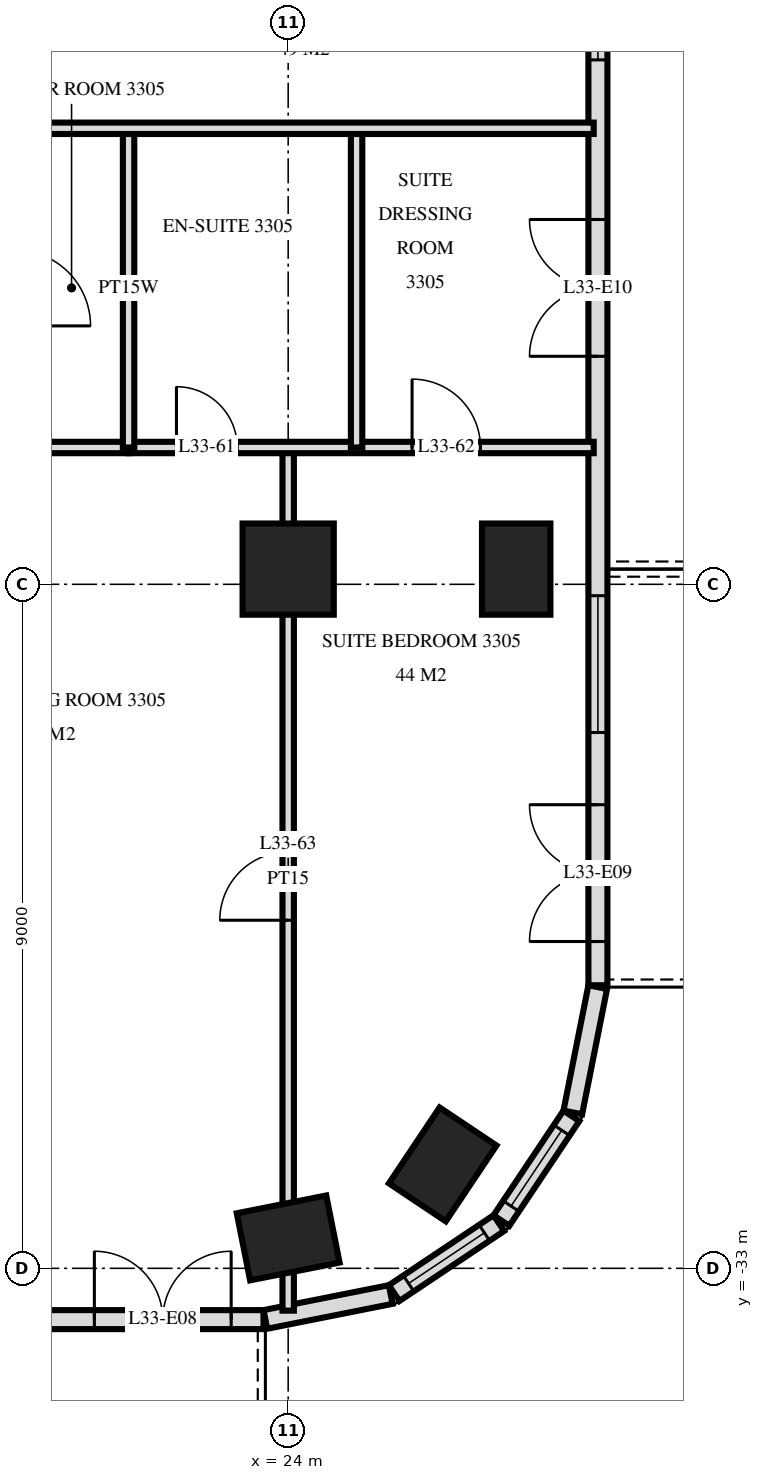
"""IFC4 building model, lengths in metres.
Left out: names, types, materials, properties, quantities, classifications, styles, units other than length and angle.
Written with IfcOpenShell. Run it as: python <this file> out.ifc"""

import sys

from ifc_helpers import new_model, si_unit, direction, frame, frame_2d, origin, origin_2d, place, context, subcontext, project, spatial, rectangle, extrude, element, fill, save


model = new_model("IFC4")
c1 = context("Model", 3, precision=1e-05, world=origin(), true_north=direction((0.0, 1.0)))
c2 = subcontext(c1, "Body", "Model", "MODEL_VIEW")
j1 = project(units=[si_unit("LENGTHUNIT", "METRE"), si_unit("PLANEANGLEUNIT", "RADIAN")], contexts=[c1])
p1 = place(None, origin())
s1 = spatial("IfcSite", under=j1, at=p1, CompositionType="ELEMENT")
p2 = place(p1, origin())
s2 = spatial("IfcBuilding", under=s1, at=p2, CompositionType="ELEMENT")
p3 = place(p2, frame((0.0, 0.0, 130.8)))
s3 = spatial("IfcBuildingStorey", under=s2, at=p3, CompositionType="ELEMENT", Elevation=130.8)
p4 = place(p3, frame((24.0, -32.6, 0.0), z_axis=(0.0, 0.0, 1.0), x_axis=(0.980792089743, 0.195056086032, 0.0)))
e1 = element("IfcColumn", 1, at=p4, inside=s3, PredefinedType="COLUMN", context=c2, shape_type="SweptSolid", body=[
    extrude(rectangle(XDim=1.2, YDim=0.9, at=origin_2d()), origin(), (0.0, 0.0, 1.0), 3.6),
])
p5 = place(p3, frame((24.0, -23.8, 0.0), z_axis=(0.0, 0.0, 1.0), x_axis=(1.0, 0.0, 0.0)))
e2 = element("IfcColumn", 2, at=p5, inside=s3, PredefinedType="COLUMN", context=c2, shape_type="SweptSolid", body=[
    extrude(rectangle(XDim=1.2, YDim=1.2, at=origin_2d()), origin(), (0.0, 0.0, 1.0), 3.6),
])
for number, where, z_axis, x_axis in (
    (3, (26.033, -31.633, 0.0), (0.0, 0.0, 1.0), (0.556, 0.831, 0.0)),
    (4, (27.0, -23.8, 0.0), (0.0, 0.0, 1.0), (0.0, 1.0, 0.0)),
):
    element("IfcColumn", number, at=place(p3, frame(where, z_axis=z_axis, x_axis=x_axis)), inside=s3, PredefinedType="COLUMN", context=c2, shape_type="SweptSolid", body=[
        extrude(rectangle(XDim=1.2, YDim=0.9, at=origin_2d()), origin(), (0.0, 0.0, 1.0), 3.6),
    ])
p6 = place(p3, frame((-23.675, -33.675, 0.0), z_axis=(0.0, 0.0, 1.0), x_axis=(1.0, 0.0, 0.0)))
e5 = element("IfcWall", 5, at=p6, inside=s3, PredefinedType="SOLIDWALL", context=c2, shape_type="SweptSolid", body=[
    extrude(rectangle(XDim=47.351, YDim=0.25, at=frame_2d((23.675, 0.0))), origin(), (0.0, 0.0, 1.0), 3.32),
])
p7 = place(p6, frame((3.425, 0.0, 0.0)))
e6 = element("IfcOpeningElement", 6, at=p7, cuts=e5, PredefinedType="OPENING", context=c2, shape_type="SweptSolid", body=[
    extrude(rectangle(XDim=1.8, YDim=2.4, at=frame_2d((0.9, 1.2))), frame((0.0, 0.135, 0.0), z_axis=(0.0, -1.0, 0.0), x_axis=(1.0, 0.0, 0.0)), (0.0, 0.0, 1.0), 0.27),
])
p8 = place(p6, frame((6.275, 0.0, 0.0)))
e7 = element("IfcOpeningElement", 7, at=p8, cuts=e5, PredefinedType="OPENING", context=c2, shape_type="SweptSolid", body=[
    extrude(rectangle(XDim=1.8, YDim=2.4, at=frame_2d((0.9, 1.2))), frame((0.0, 0.135, 0.0), z_axis=(0.0, -1.0, 0.0), x_axis=(1.0, 0.0, 0.0)), (0.0, 0.0, 1.0), 0.27),
])
p9 = place(p6, frame((8.975, 0.0, 0.3)))
e8 = element("IfcOpeningElement", 8, at=p9, cuts=e5, PredefinedType="OPENING", context=c2, shape_type="SweptSolid", body=[
    extrude(rectangle(XDim=2.4, YDim=2.1, at=frame_2d((1.2, 1.05))), frame((0.0, 0.135, 0.0), z_axis=(0.0, -1.0, 0.0), x_axis=(1.0, 0.0, 0.0)), (0.0, 0.0, 1.0), 0.27),
])
p10 = place(p6, frame((12.275, 0.0, 0.0)))
e9 = element("IfcOpeningElement", 9, at=p10, cuts=e5, PredefinedType="OPENING", context=c2, shape_type="SweptSolid", body=[
    extrude(rectangle(XDim=1.8, YDim=2.4, at=frame_2d((0.9, 1.2))), frame((0.0, 0.135, 0.0), z_axis=(0.0, -1.0, 0.0), x_axis=(1.0, 0.0, 0.0)), (0.0, 0.0, 1.0), 0.27),
])
p11 = place(p6, frame((14.975, 0.0, 0.3)))
e10 = element("IfcOpeningElement", 10, at=p11, cuts=e5, PredefinedType="OPENING", context=c2, shape_type="SweptSolid", body=[
    extrude(rectangle(XDim=2.4, YDim=2.1, at=frame_2d((1.2, 1.05))), frame((0.0, 0.135, 0.0), z_axis=(0.0, -1.0, 0.0), x_axis=(1.0, 0.0, 0.0)), (0.0, 0.0, 1.0), 0.27),
])
p12 = place(p6, frame((17.975, 0.0, 0.3)))
e11 = element("IfcOpeningElement", 11, at=p12, cuts=e5, PredefinedType="OPENING", context=c2, shape_type="SweptSolid", body=[
    extrude(rectangle(XDim=2.4, YDim=2.1, at=frame_2d((1.2, 1.05))), frame((0.0, 0.135, 0.0), z_axis=(0.0, -1.0, 0.0), x_axis=(1.0, 0.0, 0.0)), (0.0, 0.0, 1.0), 0.27),
])
p13 = place(p6, frame((21.275, 0.0, 0.0)))
e12 = element("IfcOpeningElement", 12, at=p13, cuts=e5, PredefinedType="OPENING", context=c2, shape_type="SweptSolid", body=[
    extrude(rectangle(XDim=1.8, YDim=2.4, at=frame_2d((0.9, 1.2))), frame((0.0, 0.135, 0.0), z_axis=(0.0, -1.0, 0.0), x_axis=(1.0, 0.0, 0.0)), (0.0, 0.0, 1.0), 0.27),
])
p14 = place(p6, frame((24.275, 0.0, 0.0)))
e13 = element("IfcOpeningElement", 13, at=p14, cuts=e5, PredefinedType="OPENING", context=c2, shape_type="SweptSolid", body=[
    extrude(rectangle(XDim=1.8, YDim=2.4, at=frame_2d((0.9, 1.2))), frame((0.0, 0.135, 0.0), z_axis=(0.0, -1.0, 0.0), x_axis=(1.0, 0.0, 0.0)), (0.0, 0.0, 1.0), 0.27),
])
p15 = place(p6, frame((26.975, 0.0, 0.3)))
e14 = element("IfcOpeningElement", 14, at=p15, cuts=e5, PredefinedType="OPENING", context=c2, shape_type="SweptSolid", body=[
    extrude(rectangle(XDim=2.4, YDim=2.1, at=frame_2d((1.2, 1.05))), frame((0.0, 0.135, 0.0), z_axis=(0.0, -1.0, 0.0), x_axis=(1.0, 0.0, 0.0)), (0.0, 0.0, 1.0), 0.27),
])
p16 = place(p6, frame((30.275, 0.0, 0.0)))
e15 = element("IfcOpeningElement", 15, at=p16, cuts=e5, PredefinedType="OPENING", context=c2, shape_type="SweptSolid", body=[
    extrude(rectangle(XDim=1.8, YDim=2.4, at=frame_2d((0.9, 1.2))), frame((0.0, 0.135, 0.0), z_axis=(0.0, -1.0, 0.0), x_axis=(1.0, 0.0, 0.0)), (0.0, 0.0, 1.0), 0.27),
])
p17 = place(p6, frame((32.975, 0.0, 0.3)))
e16 = element("IfcOpeningElement", 16, at=p17, cuts=e5, PredefinedType="OPENING", context=c2, shape_type="SweptSolid", body=[
    extrude(rectangle(XDim=2.4, YDim=2.1, at=frame_2d((1.2, 1.05))), frame((0.0, 0.135, 0.0), z_axis=(0.0, -1.0, 0.0), x_axis=(1.0, 0.0, 0.0)), (0.0, 0.0, 1.0), 0.27),
])
p18 = place(p6, frame((36.275, 0.0, 0.0)))
e17 = element("IfcOpeningElement", 17, at=p18, cuts=e5, PredefinedType="OPENING", context=c2, shape_type="SweptSolid", body=[
    extrude(rectangle(XDim=1.8, YDim=2.4, at=frame_2d((0.9, 1.2))), frame((0.0, 0.135, 0.0), z_axis=(0.0, -1.0, 0.0), x_axis=(1.0, 0.0, 0.0)), (0.0, 0.0, 1.0), 0.27),
])
p19 = place(p6, frame((38.975, 0.0, 0.3)))
e18 = element("IfcOpeningElement", 18, at=p19, cuts=e5, PredefinedType="OPENING", context=c2, shape_type="SweptSolid", body=[
    extrude(rectangle(XDim=2.4, YDim=2.1, at=frame_2d((1.2, 1.05))), frame((0.0, 0.135, 0.0), z_axis=(0.0, -1.0, 0.0), x_axis=(1.0, 0.0, 0.0)), (0.0, 0.0, 1.0), 0.27),
])
p20 = place(p6, frame((41.975, 0.0, 0.3)))
e19 = element("IfcOpeningElement", 19, at=p20, cuts=e5, PredefinedType="OPENING", context=c2, shape_type="SweptSolid", body=[
    extrude(rectangle(XDim=2.4, YDim=2.1, at=frame_2d((1.2, 1.05))), frame((0.0, 0.135, 0.0), z_axis=(0.0, -1.0, 0.0), x_axis=(1.0, 0.0, 0.0)), (0.0, 0.0, 1.0), 0.27),
])
p21 = place(p6, frame((45.125, 0.0, 0.0)))
e20 = element("IfcOpeningElement", 20, at=p21, cuts=e5, PredefinedType="OPENING", context=c2, shape_type="SweptSolid", body=[
    extrude(rectangle(XDim=1.8, YDim=2.4, at=frame_2d((0.9, 1.2))), frame((0.0, 0.135, 0.0), z_axis=(0.0, -1.0, 0.0), x_axis=(1.0, 0.0, 0.0)), (0.0, 0.0, 1.0), 0.27),
])
p22 = place(p3, frame((23.7, -33.673, 0.0), z_axis=(0.0, 0.0, 1.0), x_axis=(0.980775640221, 0.19513878023, 0.0)))
e21 = element("IfcWall", 21, at=p22, inside=s3, PredefinedType="SOLIDWALL", context=c2, shape_type="SweptSolid", body=[
    extrude(rectangle(XDim=1.681, YDim=0.25, at=frame_2d((0.841, 0.0))), origin(), (0.0, 0.0, 1.0), 3.32),
])
p23 = place(p3, frame((25.394, -33.326, 0.0), z_axis=(0.0, 0.0, 1.0), x_axis=(0.831482937015, 0.55555029066, 0.0)))
e22 = element("IfcWall", 22, at=p23, inside=s3, PredefinedType="SOLIDWALL", context=c2, shape_type="SweptSolid", body=[
    extrude(rectangle(XDim=1.656, YDim=0.25, at=frame_2d((0.828, 0.0))), origin(), (0.0, 0.0, 1.0), 3.32),
])
p24 = place(p23, frame((0.228, 0.0, 0.9)))
e23 = element("IfcOpeningElement", 23, at=p24, cuts=e22, PredefinedType="OPENING", context=c2, shape_type="SweptSolid", body=[
    extrude(rectangle(XDim=1.2, YDim=1.5, at=frame_2d((0.6, 0.75))), frame((0.0, 0.135, 0.0), z_axis=(0.0, -1.0, 0.0), x_axis=(1.0, 0.0, 0.0)), (0.0, 0.0, 1.0), 0.27),
])
p25 = place(p3, frame((26.806, -32.371, 0.0), z_axis=(0.0, 0.0, 1.0), x_axis=(0.55555029066, 0.831482937015, 0.0)))
e24 = element("IfcWall", 24, at=p25, inside=s3, PredefinedType="SOLIDWALL", context=c2, shape_type="SweptSolid", body=[
    extrude(rectangle(XDim=1.656, YDim=0.25, at=frame_2d((0.828, 0.0))), origin(), (0.0, 0.0, 1.0), 3.32),
])
p26 = place(p25, frame((0.228, 0.0, 0.9)))
e25 = element("IfcOpeningElement", 25, at=p26, cuts=e24, PredefinedType="OPENING", context=c2, shape_type="SweptSolid", body=[
    extrude(rectangle(XDim=1.2, YDim=1.5, at=frame_2d((0.6, 0.75))), frame((0.0, 0.135, 0.0), z_axis=(0.0, -1.0, 0.0), x_axis=(1.0, 0.0, 0.0)), (0.0, 0.0, 1.0), 0.27),
])
p27 = place(p3, frame((27.745, -30.949, 0.0), z_axis=(0.0, 0.0, 1.0), x_axis=(0.194999110559, 0.980803419081, 0.0)))
e26 = element("IfcWall", 26, at=p27, inside=s3, PredefinedType="SOLIDWALL", context=c2, shape_type="SweptSolid", body=[
    extrude(rectangle(XDim=1.681, YDim=0.25, at=frame_2d((0.841, 0.0))), origin(), (0.0, 0.0, 1.0), 3.32),
])
p28 = place(p3, frame((28.075, -29.275, 0.0), z_axis=(0.0, 0.0, 1.0), x_axis=(0.0, 1.0, 0.0)))
e27 = element("IfcWall", 27, at=p28, inside=s3, PredefinedType="SOLIDWALL", context=c2, shape_type="SweptSolid", body=[
    extrude(rectangle(XDim=25.951, YDim=0.25, at=frame_2d((12.975, 0.0))), origin(), (0.0, 0.0, 1.0), 3.32),
])
p29 = place(p28, frame((0.575, 0.0, 0.0)))
e28 = element("IfcOpeningElement", 28, at=p29, cuts=e27, PredefinedType="OPENING", context=c2, shape_type="SweptSolid", body=[
    extrude(rectangle(XDim=1.8, YDim=2.4, at=frame_2d((0.9, 1.2))), frame((0.0, 0.135, 0.0), z_axis=(0.0, -1.0, 0.0), x_axis=(1.0, 0.0, 0.0)), (0.0, 0.0, 1.0), 0.27),
])
p30 = place(p28, frame((3.325, 0.0, 0.3)))
e29 = element("IfcOpeningElement", 29, at=p30, cuts=e27, PredefinedType="OPENING", context=c2, shape_type="SweptSolid", body=[
    extrude(rectangle(XDim=1.8, YDim=2.1, at=frame_2d((0.9, 1.05))), frame((0.0, 0.135, 0.0), z_axis=(0.0, -1.0, 0.0), x_axis=(1.0, 0.0, 0.0)), (0.0, 0.0, 1.0), 0.27),
])
p31 = place(p28, frame((8.275, 0.0, 0.0)))
e30 = element("IfcOpeningElement", 30, at=p31, cuts=e27, PredefinedType="OPENING", context=c2, shape_type="SweptSolid", body=[
    extrude(rectangle(XDim=1.8, YDim=2.4, at=frame_2d((0.9, 1.2))), frame((0.0, 0.135, 0.0), z_axis=(0.0, -1.0, 0.0), x_axis=(1.0, 0.0, 0.0)), (0.0, 0.0, 1.0), 0.27),
])
p32 = place(p28, frame((12.175, 0.0, 0.3)))
e31 = element("IfcOpeningElement", 31, at=p32, cuts=e27, PredefinedType="OPENING", context=c2, shape_type="SweptSolid", body=[
    extrude(rectangle(XDim=1.2, YDim=2.1, at=frame_2d((0.6, 1.05))), frame((0.0, 0.135, 0.0), z_axis=(0.0, -1.0, 0.0), x_axis=(1.0, 0.0, 0.0)), (0.0, 0.0, 1.0), 0.27),
])
p33 = place(p28, frame((16.375, 0.0, 0.0)))
e32 = element("IfcOpeningElement", 32, at=p33, cuts=e27, PredefinedType="OPENING", context=c2, shape_type="SweptSolid", body=[
    extrude(rectangle(XDim=1.8, YDim=2.4, at=frame_2d((0.9, 1.2))), frame((0.0, 0.135, 0.0), z_axis=(0.0, -1.0, 0.0), x_axis=(1.0, 0.0, 0.0)), (0.0, 0.0, 1.0), 0.27),
])
p34 = place(p3, frame((24.9, -22.2, 0.0), z_axis=(0.0, 0.0, 1.0), x_axis=(0.0, 1.0, 0.0)))
e33 = element("IfcWall", 33, at=p34, inside=s3, PredefinedType="PARTITIONING", context=c2, shape_type="SweptSolid", body=[
    extrude(rectangle(XDim=4.2, YDim=0.15, at=frame_2d((2.1, 0.0))), origin(), (0.0, 0.0, 1.0), 3.32),
])
p35 = place(p3, frame((24.0, -33.557, 0.0), z_axis=(0.0, 0.0, 1.0), x_axis=(0.0, 1.0, 0.0)))
e34 = element("IfcWall", 34, at=p35, inside=s3, PredefinedType="PARTITIONING", context=c2, shape_type="SweptSolid", body=[
    extrude(rectangle(XDim=11.357, YDim=0.15, at=frame_2d((5.678, 0.0))), origin(), (0.0, 0.0, 1.0), 3.32),
])
p36 = place(p35, frame((5.137, 0.0, 0.0)))
e35 = element("IfcOpeningElement", 35, at=p36, cuts=e34, PredefinedType="OPENING", context=c2, shape_type="SweptSolid", body=[
    extrude(rectangle(XDim=0.9, YDim=2.1, at=frame_2d((0.45, 1.05))), frame((0.0, 0.085, 0.0), z_axis=(0.0, -1.0, 0.0), x_axis=(1.0, 0.0, 0.0)), (0.0, 0.0, 1.0), 0.17),
])
p37 = place(p3, frame((21.9, -22.2, 0.0), z_axis=(0.0, 0.0, 1.0), x_axis=(0.0, 1.0, 0.0)))
e36 = element("IfcWall", 36, at=p37, inside=s3, PredefinedType="PLUMBINGWALL", context=c2, shape_type="SweptSolid", body=[
    extrude(rectangle(XDim=4.2, YDim=0.15, at=frame_2d((2.1, 0.0))), origin(), (0.0, 0.0, 1.0), 3.32),
])
p38 = place(p3, frame((21.9, -22.2, 0.0), z_axis=(0.0, 0.0, 1.0), x_axis=(1.0, 0.0, 0.0)))
e37 = element("IfcWall", 37, at=p38, inside=s3, PredefinedType="PARTITIONING", context=c2, shape_type="SweptSolid", body=[
    extrude(rectangle(XDim=6.12, YDim=0.15, at=frame_2d((3.06, 0.0))), origin(), (0.0, 0.0, 1.0), 3.32),
])
p39 = place(p38, frame((0.63, 0.0, 0.0)))
e38 = element("IfcOpeningElement", 38, at=p39, cuts=e37, PredefinedType="OPENING", context=c2, shape_type="SweptSolid", body=[
    extrude(rectangle(XDim=0.8, YDim=2.1, at=frame_2d((0.4, 1.05))), frame((0.0, 0.085, 0.0), z_axis=(0.0, -1.0, 0.0), x_axis=(1.0, 0.0, 0.0)), (0.0, 0.0, 1.0), 0.17),
])
p40 = place(p38, frame((3.73, 0.0, 0.0)))
e39 = element("IfcOpeningElement", 39, at=p40, cuts=e37, PredefinedType="OPENING", context=c2, shape_type="SweptSolid", body=[
    extrude(rectangle(XDim=0.9, YDim=2.1, at=frame_2d((0.45, 1.05))), frame((0.0, 0.085, 0.0), z_axis=(0.0, -1.0, 0.0), x_axis=(1.0, 0.0, 0.0)), (0.0, 0.0, 1.0), 0.17),
])
p41 = place(p3, frame((20.4, -22.2, 0.0), z_axis=(0.0, 0.0, 1.0), x_axis=(1.0, 0.0, 0.0)))
e40 = element("IfcWall", 40, at=p41, inside=s3, PredefinedType="PLUMBINGWALL", context=c2, shape_type="SweptSolid", body=[
    extrude(rectangle(XDim=1.5, YDim=0.15, at=frame_2d((0.75, 0.0))), origin(), (0.0, 0.0, 1.0), 3.32),
])
p42 = place(p3, frame((-28.02, -18.0, 0.0), z_axis=(0.0, 0.0, 1.0), x_axis=(1.0, 0.0, 0.0)))
e41 = element("IfcWall", 41, at=p42, inside=s3, PredefinedType="PARTITIONING", context=c2, shape_type="SweptSolid", body=[
    extrude(rectangle(XDim=56.04, YDim=0.15, at=frame_2d((28.02, 0.0))), origin(), (0.0, 0.0, 1.0), 3.32),
])
p43 = place(p42, frame((13.17, 0.0, 0.0)))
e42 = element("IfcOpeningElement", 42, at=p43, cuts=e41, PredefinedType="OPENING", context=c2, shape_type="SweptSolid", body=[
    extrude(rectangle(XDim=1.0, YDim=2.1, at=frame_2d((0.5, 1.05))), frame((0.0, 0.085, 0.0), z_axis=(0.0, -1.0, 0.0), x_axis=(1.0, 0.0, 0.0)), (0.0, 0.0, 1.0), 0.17),
])
p44 = place(p42, frame((11.32, 0.0, 0.0)))
e43 = element("IfcOpeningElement", 43, at=p44, cuts=e41, PredefinedType="OPENING", context=c2, shape_type="SweptSolid", body=[
    extrude(rectangle(XDim=1.0, YDim=2.1, at=frame_2d((0.5, 1.05))), frame((0.0, 0.085, 0.0), z_axis=(0.0, -1.0, 0.0), x_axis=(1.0, 0.0, 0.0)), (0.0, 0.0, 1.0), 0.17),
])
p45 = place(p42, frame((41.87, 0.0, 0.0)))
e44 = element("IfcOpeningElement", 44, at=p45, cuts=e41, PredefinedType="OPENING", context=c2, shape_type="SweptSolid", body=[
    extrude(rectangle(XDim=1.0, YDim=2.1, at=frame_2d((0.5, 1.05))), frame((0.0, 0.085, 0.0), z_axis=(0.0, -1.0, 0.0), x_axis=(1.0, 0.0, 0.0)), (0.0, 0.0, 1.0), 0.17),
])
p46 = place(p42, frame((43.17, 0.0, 0.0)))
e45 = element("IfcOpeningElement", 45, at=p46, cuts=e41, PredefinedType="OPENING", context=c2, shape_type="SweptSolid", body=[
    extrude(rectangle(XDim=1.0, YDim=2.1, at=frame_2d((0.5, 1.05))), frame((0.0, 0.085, 0.0), z_axis=(0.0, -1.0, 0.0), x_axis=(1.0, 0.0, 0.0)), (0.0, 0.0, 1.0), 0.17),
])
p47 = place(p42, frame((46.72, 0.0, 0.0)))
e46 = element("IfcOpeningElement", 46, at=p47, cuts=e41, PredefinedType="OPENING", context=c2, shape_type="SweptSolid", body=[
    extrude(rectangle(XDim=1.0, YDim=2.1, at=frame_2d((0.5, 1.05))), frame((0.0, 0.085, 0.0), z_axis=(0.0, -1.0, 0.0), x_axis=(1.0, 0.0, 0.0)), (0.0, 0.0, 1.0), 0.17),
])
p48 = place(p42, frame((21.52, 0.0, 0.0)))
e47 = element("IfcOpeningElement", 47, at=p48, cuts=e41, PredefinedType="OPENING", context=c2, shape_type="SweptSolid", body=[
    extrude(rectangle(XDim=1.0, YDim=2.1, at=frame_2d((0.5, 1.05))), frame((0.0, 0.085, 0.0), z_axis=(0.0, -1.0, 0.0), x_axis=(1.0, 0.0, 0.0)), (0.0, 0.0, 1.0), 0.17),
])
p49 = place(p42, frame((33.52, 0.0, 0.0)))
e48 = element("IfcOpeningElement", 48, at=p49, cuts=e41, PredefinedType="OPENING", context=c2, shape_type="SweptSolid", body=[
    extrude(rectangle(XDim=1.0, YDim=2.1, at=frame_2d((0.5, 1.05))), frame((0.0, 0.085, 0.0), z_axis=(0.0, -1.0, 0.0), x_axis=(1.0, 0.0, 0.0)), (0.0, 0.0, 1.0), 0.17),
])
p50 = place(p24, origin())
e49 = element("IfcWindow", 49, at=p50, inside=s3, PartitioningType="SINGLE_PANEL", PredefinedType="WINDOW", context=c2, shape_type="SweptSolid", body=[
    extrude(rectangle(XDim=1.2, YDim=1.5, at=frame_2d((0.6, 0.75))), frame((0.0, 0.03, 0.0), z_axis=(0.0, -1.0, 0.0), x_axis=(1.0, 0.0, 0.0)), (0.0, 0.0, 1.0), 0.06),
])
fill(e23, e49)
p51 = place(p26, origin())
e50 = element("IfcWindow", 50, at=p51, inside=s3, PartitioningType="SINGLE_PANEL", PredefinedType="WINDOW", context=c2, shape_type="SweptSolid", body=[
    extrude(rectangle(XDim=1.2, YDim=1.5, at=frame_2d((0.6, 0.75))), frame((0.0, 0.03, 0.0), z_axis=(0.0, -1.0, 0.0), x_axis=(1.0, 0.0, 0.0)), (0.0, 0.0, 1.0), 0.06),
])
fill(e25, e50)
p52 = place(p21, origin())
e51 = element("IfcDoor", 51, at=p52, inside=s3, OperationType="DOUBLE_DOOR_SINGLE_SWING", PredefinedType="DOOR", context=c2, shape_type="SweptSolid", body=[
    extrude(rectangle(XDim=1.8, YDim=2.4, at=frame_2d((0.9, 1.2))), frame((0.0, 0.025, 0.0), z_axis=(0.0, -1.0, 0.0), x_axis=(1.0, 0.0, 0.0)), (0.0, 0.0, 1.0), 0.05),
])
fill(e20, e51)
p53 = place(p29, origin())
e52 = element("IfcDoor", 52, at=p53, inside=s3, OperationType="DOUBLE_DOOR_SINGLE_SWING", PredefinedType="DOOR", context=c2, shape_type="SweptSolid", body=[
    extrude(rectangle(XDim=1.8, YDim=2.4, at=frame_2d((0.9, 1.2))), frame((0.0, 0.025, 0.0), z_axis=(0.0, -1.0, 0.0), x_axis=(1.0, 0.0, 0.0)), (0.0, 0.0, 1.0), 0.05),
])
fill(e28, e52)
p54 = place(p30, origin())
e53 = element("IfcWindow", 53, at=p54, inside=s3, PartitioningType="SINGLE_PANEL", PredefinedType="WINDOW", context=c2, shape_type="SweptSolid", body=[
    extrude(rectangle(XDim=1.8, YDim=2.1, at=frame_2d((0.9, 1.05))), frame((0.0, 0.03, 0.0), z_axis=(0.0, -1.0, 0.0), x_axis=(1.0, 0.0, 0.0)), (0.0, 0.0, 1.0), 0.06),
])
fill(e29, e53)
p55 = place(p31, origin())
e54 = element("IfcDoor", 54, at=p55, inside=s3, OperationType="DOUBLE_DOOR_SINGLE_SWING", PredefinedType="DOOR", context=c2, shape_type="SweptSolid", body=[
    extrude(rectangle(XDim=1.8, YDim=2.4, at=frame_2d((0.9, 1.2))), frame((0.0, 0.025, 0.0), z_axis=(0.0, -1.0, 0.0), x_axis=(1.0, 0.0, 0.0)), (0.0, 0.0, 1.0), 0.05),
])
fill(e30, e54)
p56 = place(p32, origin())
e55 = element("IfcWindow", 55, at=p56, inside=s3, PartitioningType="SINGLE_PANEL", PredefinedType="WINDOW", context=c2, shape_type="SweptSolid", body=[
    extrude(rectangle(XDim=1.2, YDim=2.1, at=frame_2d((0.6, 1.05))), frame((0.0, 0.03, 0.0), z_axis=(0.0, -1.0, 0.0), x_axis=(1.0, 0.0, 0.0)), (0.0, 0.0, 1.0), 0.06),
])
fill(e31, e55)
p57 = place(p39, origin())
e56 = element("IfcDoor", 56, at=p57, inside=s3, OperationType="SINGLE_SWING_RIGHT", PredefinedType="DOOR", context=c2, shape_type="SweptSolid", body=[
    extrude(rectangle(XDim=0.8, YDim=2.1, at=frame_2d((0.4, 1.05))), frame((0.0, 0.025, 0.0), z_axis=(0.0, -1.0, 0.0), x_axis=(1.0, 0.0, 0.0)), (0.0, 0.0, 1.0), 0.05),
])
fill(e38, e56)
p58 = place(p40, origin())
e57 = element("IfcDoor", 57, at=p58, inside=s3, OperationType="SINGLE_SWING_RIGHT", PredefinedType="DOOR", context=c2, shape_type="SweptSolid", body=[
    extrude(rectangle(XDim=0.9, YDim=2.1, at=frame_2d((0.45, 1.05))), frame((0.0, 0.025, 0.0), z_axis=(0.0, -1.0, 0.0), x_axis=(1.0, 0.0, 0.0)), (0.0, 0.0, 1.0), 0.05),
])
fill(e39, e57)
p59 = place(p36, origin())
e58 = element("IfcDoor", 58, at=p59, inside=s3, OperationType="SINGLE_SWING_RIGHT", PredefinedType="DOOR", context=c2, shape_type="SweptSolid", body=[
    extrude(rectangle(XDim=0.9, YDim=2.1, at=frame_2d((0.45, 1.05))), frame((0.0, 0.025, 0.0), z_axis=(0.0, -1.0, 0.0), x_axis=(1.0, 0.0, 0.0)), (0.0, 0.0, 1.0), 0.05),
])
fill(e35, e58)
save(model, sys.argv[1])
